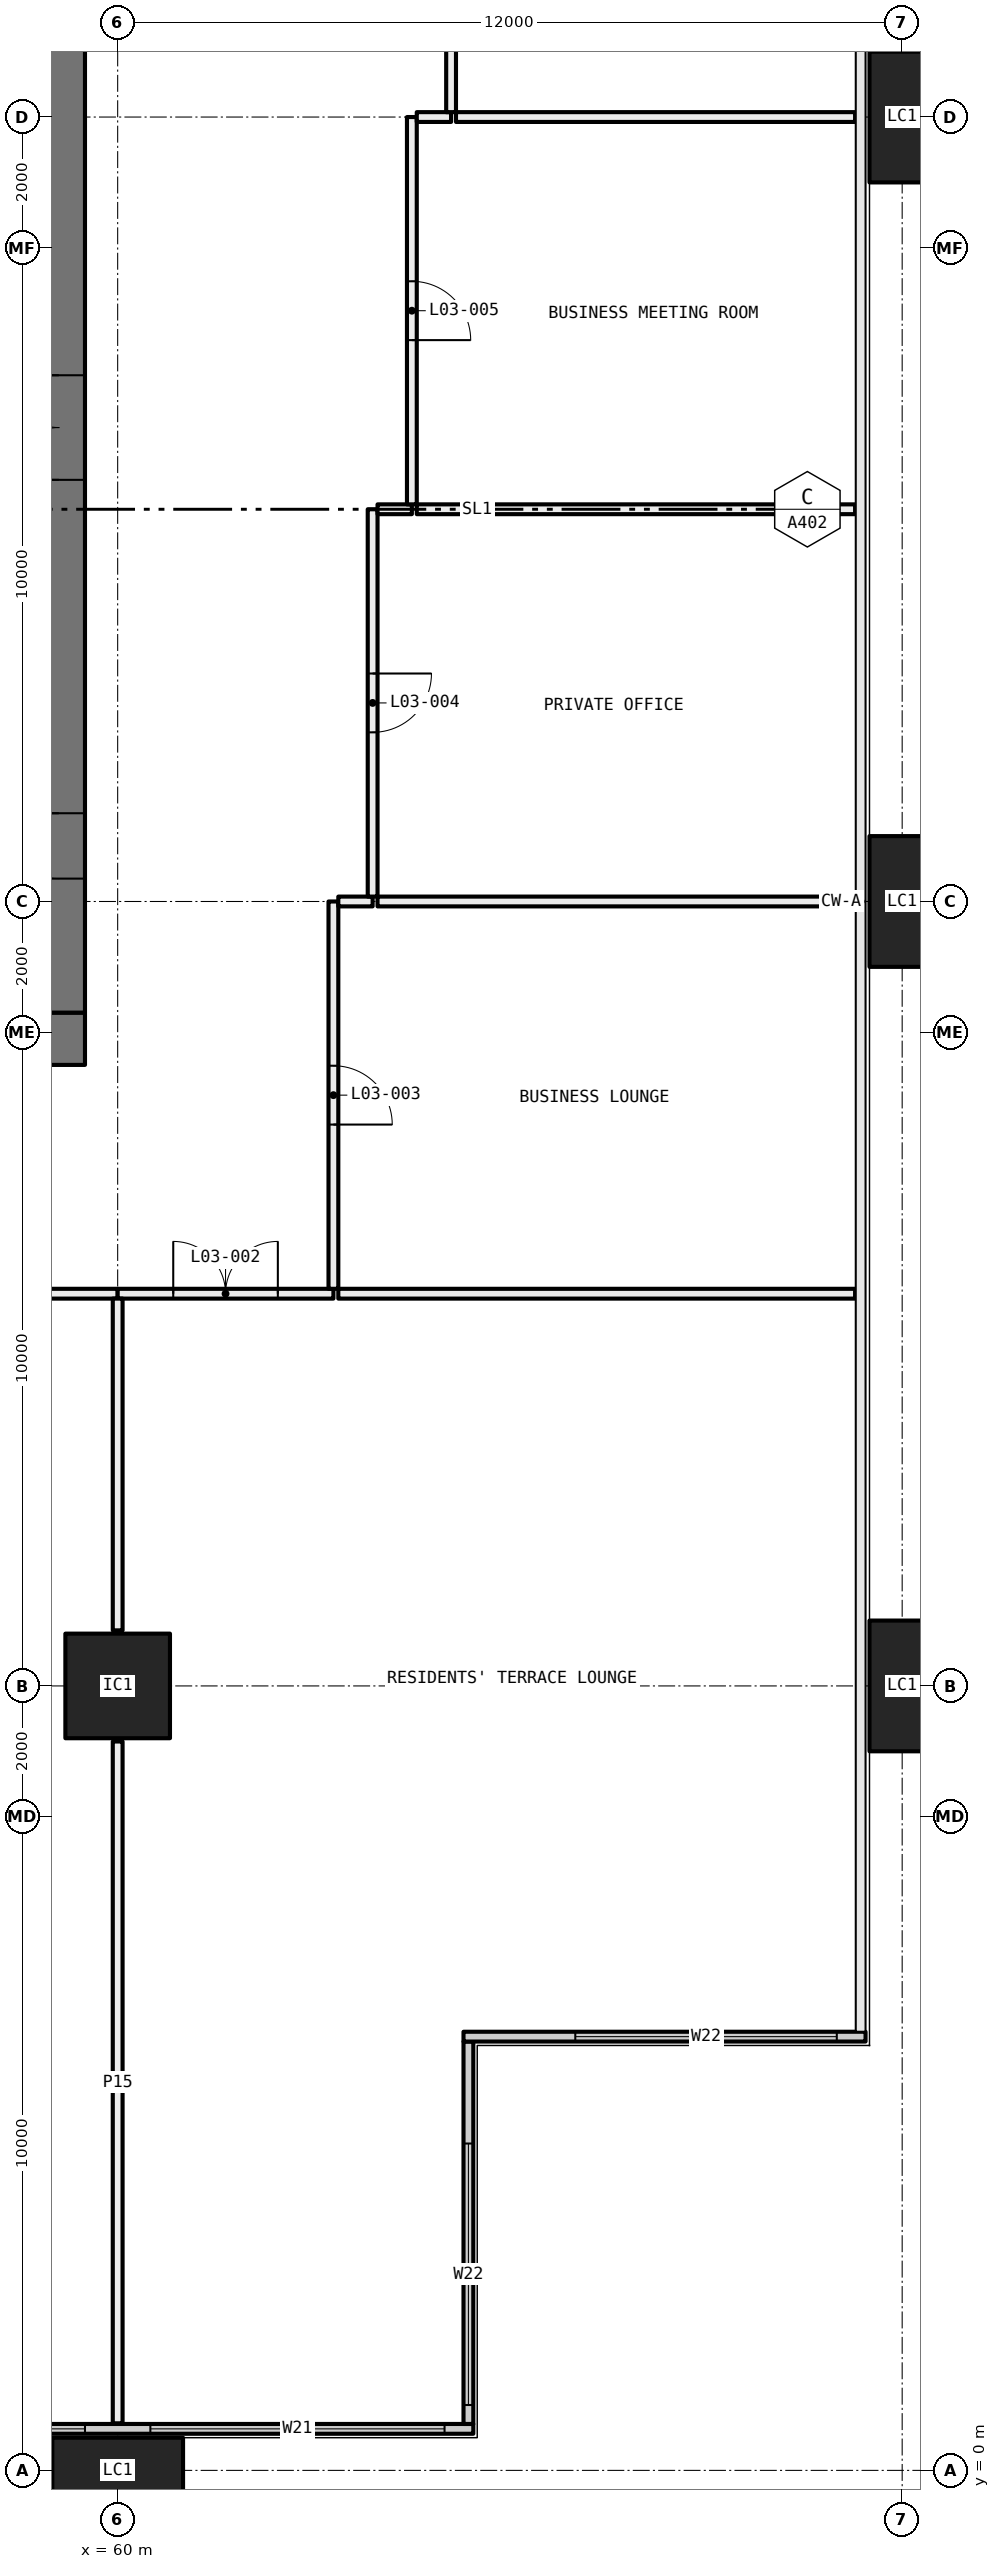
"""IFC4 building model, lengths in metres.
Left out: names, types, materials, properties, quantities, classifications, styles, units other than length and angle.
Written with IfcOpenShell. Run it as: python <this file> out.ifc"""

import sys

from ifc_helpers import new_model, si_unit, direction, frame, frame_2d, origin, origin_2d, place, context, subcontext, project, spatial, rectangle, hollow_rectangle, extrude, element, fill, save


model = new_model("IFC4")
c1 = context("Model", 3, precision=1e-05, world=origin(), true_north=direction((0.0, 1.0)))
c2 = subcontext(c1, "Body", "Model", "MODEL_VIEW")
j1 = project(units=[si_unit("LENGTHUNIT", "METRE"), si_unit("PLANEANGLEUNIT", "RADIAN")], contexts=[c1])
p1 = place(None, origin())
s1 = spatial("IfcSite", under=j1, at=p1, CompositionType="ELEMENT")
p2 = place(p1, origin())
s2 = spatial("IfcBuilding", under=s1, at=p2, CompositionType="ELEMENT")
p3 = place(p2, frame((0.0, 0.0, 18.0)))
s3 = spatial("IfcBuildingStorey", under=s2, at=p3, CompositionType="ELEMENT", Elevation=18.0)
p4 = place(p3, frame((60.0, 0.0, -0.4), z_axis=(0.0, 0.0, 1.0), x_axis=(1.0, 0.0, 0.0)))
e1 = element("IfcColumn", 1, at=p4, inside=s3, PredefinedType="COLUMN", context=c2, shape_type="SweptSolid", body=[
    extrude(hollow_rectangle(XDim=2.0, YDim=1.0, WallThickness=0.08, at=origin_2d()), origin(), (0.0, 0.0, 1.0), 6.0),
])
p5 = place(p3, frame((60.0, 12.0, 0.0), z_axis=(0.0, 0.0, 1.0), x_axis=(1.0, 0.0, 0.0)))
e2 = element("IfcColumn", 2, at=p5, inside=s3, PredefinedType="COLUMN", context=c2, shape_type="SweptSolid", body=[
    extrude(hollow_rectangle(XDim=1.6, YDim=1.6, WallThickness=0.07, at=origin_2d()), origin(), (0.0, 0.0, 1.0), 5.6),
])
for number, where, z_axis, x_axis in (
    (3, (72.0, 12.0, -0.4), (0.0, 0.0, 1.0), (0.0, 1.0, 0.0)),
    (4, (72.0, 24.0, -0.4), (0.0, 0.0, 1.0), (0.0, 1.0, 0.0)),
    (5, (72.0, 36.0, -0.4), (0.0, 0.0, 1.0), (0.0, 1.0, 0.0)),
):
    element("IfcColumn", number, at=place(p3, frame(where, z_axis=z_axis, x_axis=x_axis)), inside=s3, PredefinedType="COLUMN", context=c2, shape_type="SweptSolid", body=[
        extrude(hollow_rectangle(XDim=2.0, YDim=1.0, WallThickness=0.08, at=origin_2d()), origin(), (0.0, 0.0, 1.0), 6.0),
    ])
p6 = place(p3, frame((48.56, 0.635, 0.0), z_axis=(0.0, 0.0, 1.0), x_axis=(1.0, 0.0, 0.0)))
e6 = element("IfcWall", 6, at=p6, inside=s3, PredefinedType="ELEMENTEDWALL", context=c2, shape_type="SweptSolid", body=[
    extrude(rectangle(XDim=16.88, YDim=0.15, at=frame_2d((8.44, 0.0))), origin(), (0.0, 0.0, 1.0), 5.6),
])
p7 = place(p6, frame((0.44, 0.0, 0.45)))
e7 = element("IfcOpeningElement", 7, at=p7, cuts=e6, PredefinedType="OPENING", context=c2, shape_type="SweptSolid", body=[
    extrude(rectangle(XDim=4.5, YDim=5.1, at=frame_2d((2.25, 2.55))), frame((0.0, 0.085, 0.0), z_axis=(0.0, -1.0, 0.0), x_axis=(1.0, 0.0, 0.0)), (0.0, 0.0, 1.0), 0.17),
])
p8 = place(p6, frame((5.94, 0.0, 0.45)))
e8 = element("IfcOpeningElement", 8, at=p8, cuts=e6, PredefinedType="OPENING", context=c2, shape_type="SweptSolid", body=[
    extrude(rectangle(XDim=2.0, YDim=5.1, at=frame_2d((1.0, 2.55))), frame((0.0, 0.085, 0.0), z_axis=(0.0, -1.0, 0.0), x_axis=(1.0, 0.0, 0.0)), (0.0, 0.0, 1.0), 0.17),
])
p9 = place(p6, frame((8.94, 0.0, 0.45)))
e9 = element("IfcOpeningElement", 9, at=p9, cuts=e6, PredefinedType="OPENING", context=c2, shape_type="SweptSolid", body=[
    extrude(rectangle(XDim=2.0, YDim=5.1, at=frame_2d((1.0, 2.55))), frame((0.0, 0.085, 0.0), z_axis=(0.0, -1.0, 0.0), x_axis=(1.0, 0.0, 0.0)), (0.0, 0.0, 1.0), 0.17),
])
p10 = place(p6, frame((11.94, 0.0, 0.45)))
e10 = element("IfcOpeningElement", 10, at=p10, cuts=e6, PredefinedType="OPENING", context=c2, shape_type="SweptSolid", body=[
    extrude(rectangle(XDim=4.5, YDim=5.1, at=frame_2d((2.25, 2.55))), frame((0.0, 0.085, 0.0), z_axis=(0.0, -1.0, 0.0), x_axis=(1.0, 0.0, 0.0)), (0.0, 0.0, 1.0), 0.17),
])
p11 = place(p3, frame((65.365, 0.71, 0.0), z_axis=(0.0, 0.0, 1.0), x_axis=(0.0, 1.0, 0.0)))
e11 = element("IfcWall", 11, at=p11, inside=s3, PredefinedType="ELEMENTEDWALL", context=c2, shape_type="SweptSolid", body=[
    extrude(rectangle(XDim=5.85, YDim=0.15, at=frame_2d((2.925, 0.0))), origin(), (0.0, 0.0, 1.0), 5.6),
])
p12 = place(p11, frame((0.29, 0.0, 0.45)))
e12 = element("IfcOpeningElement", 12, at=p12, cuts=e11, PredefinedType="OPENING", context=c2, shape_type="SweptSolid", body=[
    extrude(rectangle(XDim=4.0, YDim=5.1, at=frame_2d((2.0, 2.55))), frame((0.0, 0.085, 0.0), z_axis=(0.0, -1.0, 0.0), x_axis=(1.0, 0.0, 0.0)), (0.0, 0.0, 1.0), 0.17),
])
p13 = place(p3, frame((65.29, 6.635, 0.0), z_axis=(0.0, 0.0, 1.0), x_axis=(1.0, 0.0, 0.0)))
e13 = element("IfcWall", 13, at=p13, inside=s3, PredefinedType="ELEMENTEDWALL", context=c2, shape_type="SweptSolid", body=[
    extrude(rectangle(XDim=6.15, YDim=0.15, at=frame_2d((3.075, 0.0))), origin(), (0.0, 0.0, 1.0), 5.6),
])
p14 = place(p13, frame((1.71, 0.0, 0.45)))
e14 = element("IfcOpeningElement", 14, at=p14, cuts=e13, PredefinedType="OPENING", context=c2, shape_type="SweptSolid", body=[
    extrude(rectangle(XDim=4.0, YDim=5.1, at=frame_2d((2.0, 2.55))), frame((0.0, 0.085, 0.0), z_axis=(0.0, -1.0, 0.0), x_axis=(1.0, 0.0, 0.0)), (0.0, 0.0, 1.0), 0.17),
])
p15 = place(p3, frame((48.72, 18.0, 0.0), z_axis=(0.0, 0.0, 1.0), x_axis=(1.0, 0.0, 0.0)))
e15 = element("IfcWall", 15, at=p15, inside=s3, PredefinedType="PARTITIONING", context=c2, shape_type="SweptSolid", body=[
    extrude(rectangle(XDim=11.28, YDim=0.15, at=frame_2d((5.64, 0.0))), origin(), (0.0, 0.0, 1.0), 5.6),
])
p16 = place(p15, frame((4.84, 0.0, 0.0)))
e16 = element("IfcOpeningElement", 16, at=p16, cuts=e15, PredefinedType="OPENING", context=c2, shape_type="SweptSolid", body=[
    extrude(rectangle(XDim=1.6, YDim=2.1, at=frame_2d((0.8, 1.05))), frame((0.0, 0.085, 0.0), z_axis=(0.0, -1.0, 0.0), x_axis=(1.0, 0.0, 0.0)), (0.0, 0.0, 1.0), 0.17),
])
p17 = place(p3, frame((60.0, 18.0, 0.0), z_axis=(0.0, 0.0, 1.0), x_axis=(1.0, 0.0, 0.0)))
e17 = element("IfcWall", 17, at=p17, inside=s3, PredefinedType="PARTITIONING", context=c2, shape_type="SweptSolid", body=[
    extrude(rectangle(XDim=3.3, YDim=0.15, at=frame_2d((1.65, 0.0))), origin(), (0.0, 0.0, 1.0), 5.6),
])
p18 = place(p17, frame((0.85, 0.0, 0.0)))
e18 = element("IfcOpeningElement", 18, at=p18, cuts=e17, PredefinedType="OPENING", context=c2, shape_type="SweptSolid", body=[
    extrude(rectangle(XDim=1.6, YDim=2.1, at=frame_2d((0.8, 1.05))), frame((0.0, 0.085, 0.0), z_axis=(0.0, -1.0, 0.0), x_axis=(1.0, 0.0, 0.0)), (0.0, 0.0, 1.0), 0.17),
])
p19 = place(p3, frame((63.3, 18.075, 0.0), z_axis=(0.0, 0.0, 1.0), x_axis=(0.0, 1.0, 0.0)))
e19 = element("IfcWall", 19, at=p19, inside=s3, PredefinedType="PARTITIONING", context=c2, shape_type="SweptSolid", body=[
    extrude(rectangle(XDim=5.925, YDim=0.15, at=frame_2d((2.962, 0.0))), origin(), (0.0, 0.0, 1.0), 5.6),
])
p20 = place(p19, frame((2.512, 0.0, 0.0)))
e20 = element("IfcOpeningElement", 20, at=p20, cuts=e19, PredefinedType="OPENING", context=c2, shape_type="SweptSolid", body=[
    extrude(rectangle(XDim=0.9, YDim=2.1, at=frame_2d((0.45, 1.05))), frame((0.0, 0.085, 0.0), z_axis=(0.0, -1.0, 0.0), x_axis=(1.0, 0.0, 0.0)), (0.0, 0.0, 1.0), 0.17),
])
p21 = place(p3, frame((63.375, 24.0, 0.0), z_axis=(0.0, 0.0, 1.0), x_axis=(1.0, 0.0, 0.0)))
e21 = element("IfcWall", 21, at=p21, inside=s3, PredefinedType="PARTITIONING", context=c2, shape_type="SweptSolid", body=[
    extrude(rectangle(XDim=0.525, YDim=0.15, at=frame_2d((0.262, 0.0))), origin(), (0.0, 0.0, 1.0), 5.6),
])
p22 = place(p3, frame((63.9, 24.075, 0.0), z_axis=(0.0, 0.0, 1.0), x_axis=(0.0, 1.0, 0.0)))
e22 = element("IfcWall", 22, at=p22, inside=s3, PredefinedType="PARTITIONING", context=c2, shape_type="SweptSolid", body=[
    extrude(rectangle(XDim=5.925, YDim=0.15, at=frame_2d((2.962, 0.0))), origin(), (0.0, 0.0, 1.0), 5.6),
])
p23 = place(p22, frame((2.512, 0.0, 0.0)))
e23 = element("IfcOpeningElement", 23, at=p23, cuts=e22, PredefinedType="OPENING", context=c2, shape_type="SweptSolid", body=[
    extrude(rectangle(XDim=0.9, YDim=2.1, at=frame_2d((0.45, 1.05))), frame((0.0, 0.085, 0.0), z_axis=(0.0, -1.0, 0.0), x_axis=(1.0, 0.0, 0.0)), (0.0, 0.0, 1.0), 0.17),
])
p24 = place(p3, frame((63.975, 30.0, 0.0), z_axis=(0.0, 0.0, 1.0), x_axis=(1.0, 0.0, 0.0)))
e24 = element("IfcWall", 24, at=p24, inside=s3, PredefinedType="PARTITIONING", context=c2, shape_type="SweptSolid", body=[
    extrude(rectangle(XDim=0.525, YDim=0.15, at=frame_2d((0.262, 0.0))), origin(), (0.0, 0.0, 1.0), 5.6),
])
p25 = place(p3, frame((64.5, 30.075, 0.0), z_axis=(0.0, 0.0, 1.0), x_axis=(0.0, 1.0, 0.0)))
e25 = element("IfcWall", 25, at=p25, inside=s3, PredefinedType="PARTITIONING", context=c2, shape_type="SweptSolid", body=[
    extrude(rectangle(XDim=5.925, YDim=0.15, at=frame_2d((2.962, 0.0))), origin(), (0.0, 0.0, 1.0), 5.6),
])
p26 = place(p25, frame((2.512, 0.0, 0.0)))
e26 = element("IfcOpeningElement", 26, at=p26, cuts=e25, PredefinedType="OPENING", context=c2, shape_type="SweptSolid", body=[
    extrude(rectangle(XDim=0.9, YDim=2.1, at=frame_2d((0.45, 1.05))), frame((0.0, 0.085, 0.0), z_axis=(0.0, -1.0, 0.0), x_axis=(1.0, 0.0, 0.0)), (0.0, 0.0, 1.0), 0.17),
])
p27 = place(p3, frame((64.575, 36.0, 0.0), z_axis=(0.0, 0.0, 1.0), x_axis=(1.0, 0.0, 0.0)))
e27 = element("IfcWall", 27, at=p27, inside=s3, PredefinedType="PARTITIONING", context=c2, shape_type="SweptSolid", body=[
    extrude(rectangle(XDim=0.525, YDim=0.15, at=frame_2d((0.263, 0.0))), origin(), (0.0, 0.0, 1.0), 5.6),
])
p28 = place(p3, frame((65.1, 36.075, 0.0), z_axis=(0.0, 0.0, 1.0), x_axis=(0.0, 1.0, 0.0)))
e28 = element("IfcWall", 28, at=p28, inside=s3, PredefinedType="PARTITIONING", context=c2, shape_type="SweptSolid", body=[
    extrude(rectangle(XDim=5.825, YDim=0.15, at=frame_2d((2.913, 0.0))), origin(), (0.0, 0.0, 1.0), 5.6),
])
p29 = place(p28, frame((2.462, 0.0, 0.0)))
e29 = element("IfcOpeningElement", 29, at=p29, cuts=e28, PredefinedType="OPENING", context=c2, shape_type="SweptSolid", body=[
    extrude(rectangle(XDim=0.9, YDim=2.1, at=frame_2d((0.45, 1.05))), frame((0.0, 0.085, 0.0), z_axis=(0.0, -1.0, 0.0), x_axis=(1.0, 0.0, 0.0)), (0.0, 0.0, 1.0), 0.17),
])
p30 = place(p3, frame((60.0, 0.72, 0.0), z_axis=(0.0, 0.0, 1.0), x_axis=(0.0, 1.0, 0.0)))
e30 = element("IfcWall", 30, at=p30, inside=s3, PredefinedType="PARTITIONING", context=c2, shape_type="SweptSolid", body=[
    extrude(rectangle(XDim=10.43, YDim=0.15, at=frame_2d((5.215, 0.0))), origin(), (0.0, 0.0, 1.0), 5.6),
])
p31 = place(p3, frame((60.0, 12.85, 0.0), z_axis=(0.0, 0.0, 1.0), x_axis=(0.0, 1.0, 0.0)))
e31 = element("IfcWall", 31, at=p31, inside=s3, PredefinedType="PARTITIONING", context=c2, shape_type="SweptSolid", body=[
    extrude(rectangle(XDim=5.075, YDim=0.15, at=frame_2d((2.538, 0.0))), origin(), (0.0, 0.0, 1.0), 5.6),
])
p32 = place(p3, frame((71.28, 18.0, 0.0), z_axis=(0.0, 0.0, 1.0), x_axis=(-1.0, 0.0, 0.0)))
e32 = element("IfcWall", 32, at=p32, inside=s3, PredefinedType="PARTITIONING", context=c2, shape_type="SweptSolid", body=[
    extrude(rectangle(XDim=7.905, YDim=0.15, at=frame_2d((3.953, 0.0))), origin(), (0.0, 0.0, 1.0), 5.6),
])
p33 = place(p3, frame((71.28, 24.0, 0.0), z_axis=(0.0, 0.0, 1.0), x_axis=(-1.0, 0.0, 0.0)))
e33 = element("IfcWall", 33, at=p33, inside=s3, PredefinedType="PARTITIONING", context=c2, shape_type="SweptSolid", body=[
    extrude(rectangle(XDim=7.305, YDim=0.15, at=frame_2d((3.652, 0.0))), origin(), (0.0, 0.0, 1.0), 5.6),
])
p34 = place(p3, frame((71.28, 30.0, 0.0), z_axis=(0.0, 0.0, 1.0), x_axis=(-1.0, 0.0, 0.0)))
e34 = element("IfcWall", 34, at=p34, inside=s3, PredefinedType="PARTITIONING", context=c2, shape_type="SweptSolid", body=[
    extrude(rectangle(XDim=6.705, YDim=0.15, at=frame_2d((3.353, 0.0))), origin(), (0.0, 0.0, 1.0), 5.6),
])
p35 = place(p3, frame((71.28, 36.0, 0.0), z_axis=(0.0, 0.0, 1.0), x_axis=(-1.0, 0.0, 0.0)))
e35 = element("IfcWall", 35, at=p35, inside=s3, PredefinedType="PARTITIONING", context=c2, shape_type="SweptSolid", body=[
    extrude(rectangle(XDim=6.105, YDim=0.15, at=frame_2d((3.052, 0.0))), origin(), (0.0, 0.0, 1.0), 5.6),
])
p36 = place(p3, frame((59.5, 21.9, 0.0), z_axis=(0.0, 0.0, 1.0), x_axis=(-1.0, 0.0, 0.0)))
e36 = element("IfcWall", 36, at=p36, inside=s3, PredefinedType="SHEAR", context=c2, shape_type="SweptSolid", body=[
    extrude(rectangle(XDim=11.0, YDim=0.8, at=frame_2d((5.5, 0.0))), origin(), (0.0, 0.0, 1.0), 5.6),
])
p37 = place(p3, frame((59.1, 22.3, 0.0), z_axis=(0.0, 0.0, 1.0), x_axis=(0.0, 1.0, 0.0)))
e37 = element("IfcWall", 37, at=p37, inside=s3, PredefinedType="SHEAR", context=c2, shape_type="SweptSolid", body=[
    extrude(rectangle(XDim=15.4, YDim=0.8, at=frame_2d((7.7, 0.0))), origin(), (0.0, 0.0, 1.0), 5.6),
])
p38 = place(p37, frame((8.15, 0.0, 0.0)))
e38 = element("IfcOpeningElement", 38, at=p38, cuts=e37, PredefinedType="OPENING", context=c2, shape_type="SweptSolid", body=[
    extrude(rectangle(XDim=1.6, YDim=2.1, at=frame_2d((0.8, 1.05))), frame((0.0, 0.41, 0.0), z_axis=(0.0, -1.0, 0.0), x_axis=(1.0, 0.0, 0.0)), (0.0, 0.0, 1.0), 0.82),
])
p39 = place(p37, frame((2.05, 0.0, 0.0)))
e39 = element("IfcOpeningElement", 39, at=p39, cuts=e37, PredefinedType="OPENING", context=c2, shape_type="SweptSolid", body=[
    extrude(rectangle(XDim=1.0, YDim=2.1, at=frame_2d((0.5, 1.05))), frame((0.0, 0.41, 0.0), z_axis=(0.0, -1.0, 0.0), x_axis=(1.0, 0.0, 0.0)), (0.0, 0.0, 1.0), 0.82),
])
p40 = place(p9, origin())
e40 = element("IfcWindow", 40, at=p40, inside=s3, PartitioningType="SINGLE_PANEL", PredefinedType="WINDOW", context=c2, shape_type="SweptSolid", body=[
    extrude(rectangle(XDim=2.0, YDim=5.1, at=frame_2d((1.0, 2.55))), frame((0.0, 0.03, 0.0), z_axis=(0.0, -1.0, 0.0), x_axis=(1.0, 0.0, 0.0)), (0.0, 0.0, 1.0), 0.06),
])
fill(e9, e40)
p41 = place(p10, origin())
e41 = element("IfcWindow", 41, at=p41, inside=s3, PartitioningType="SINGLE_PANEL", PredefinedType="WINDOW", context=c2, shape_type="SweptSolid", body=[
    extrude(rectangle(XDim=4.5, YDim=5.1, at=frame_2d((2.25, 2.55))), frame((0.0, 0.03, 0.0), z_axis=(0.0, -1.0, 0.0), x_axis=(1.0, 0.0, 0.0)), (0.0, 0.0, 1.0), 0.06),
])
fill(e10, e41)
p42 = place(p12, origin())
e42 = element("IfcWindow", 42, at=p42, inside=s3, PartitioningType="SINGLE_PANEL", PredefinedType="WINDOW", context=c2, shape_type="SweptSolid", body=[
    extrude(rectangle(XDim=4.0, YDim=5.1, at=frame_2d((2.0, 2.55))), frame((0.0, 0.03, 0.0), z_axis=(0.0, -1.0, 0.0), x_axis=(1.0, 0.0, 0.0)), (0.0, 0.0, 1.0), 0.06),
])
fill(e12, e42)
p43 = place(p14, origin())
e43 = element("IfcWindow", 43, at=p43, inside=s3, PartitioningType="SINGLE_PANEL", PredefinedType="WINDOW", context=c2, shape_type="SweptSolid", body=[
    extrude(rectangle(XDim=4.0, YDim=5.1, at=frame_2d((2.0, 2.55))), frame((0.0, 0.03, 0.0), z_axis=(0.0, -1.0, 0.0), x_axis=(1.0, 0.0, 0.0)), (0.0, 0.0, 1.0), 0.06),
])
fill(e14, e43)
p44 = place(p18, origin())
e44 = element("IfcDoor", 44, at=p44, inside=s3, OperationType="DOUBLE_DOOR_SINGLE_SWING", PredefinedType="DOOR", context=c2, shape_type="SweptSolid", body=[
    extrude(rectangle(XDim=1.6, YDim=2.1, at=frame_2d((0.8, 1.05))), frame((0.0, 0.025, 0.0), z_axis=(0.0, -1.0, 0.0), x_axis=(1.0, 0.0, 0.0)), (0.0, 0.0, 1.0), 0.05),
])
fill(e18, e44)
p45 = place(p20, frame((0.9, 0.0, 0.0), x_axis=(-1.0, 0.0, 0.0)))
e45 = element("IfcDoor", 45, at=p45, inside=s3, OperationType="SINGLE_SWING_LEFT", PredefinedType="DOOR", context=c2, shape_type="SweptSolid", body=[
    extrude(rectangle(XDim=0.9, YDim=2.1, at=frame_2d((0.45, 1.05))), frame((0.0, 0.025, 0.0), z_axis=(0.0, -1.0, 0.0), x_axis=(1.0, 0.0, 0.0)), (0.0, 0.0, 1.0), 0.05),
])
fill(e20, e45)
p46 = place(p23, frame((0.9, 0.0, 0.0), x_axis=(-1.0, 0.0, 0.0)))
e46 = element("IfcDoor", 46, at=p46, inside=s3, OperationType="SINGLE_SWING_RIGHT", PredefinedType="DOOR", context=c2, shape_type="SweptSolid", body=[
    extrude(rectangle(XDim=0.9, YDim=2.1, at=frame_2d((0.45, 1.05))), frame((0.0, 0.025, 0.0), z_axis=(0.0, -1.0, 0.0), x_axis=(1.0, 0.0, 0.0)), (0.0, 0.0, 1.0), 0.05),
])
fill(e23, e46)
p47 = place(p26, frame((0.9, 0.0, 0.0), x_axis=(-1.0, 0.0, 0.0)))
e47 = element("IfcDoor", 47, at=p47, inside=s3, OperationType="SINGLE_SWING_LEFT", PredefinedType="DOOR", context=c2, shape_type="SweptSolid", body=[
    extrude(rectangle(XDim=0.9, YDim=2.1, at=frame_2d((0.45, 1.05))), frame((0.0, 0.025, 0.0), z_axis=(0.0, -1.0, 0.0), x_axis=(1.0, 0.0, 0.0)), (0.0, 0.0, 1.0), 0.05),
])
fill(e26, e47)
p48 = place(p38, origin())
e48 = element("IfcDoor", 48, at=p48, inside=s3, OperationType="DOUBLE_DOOR_SINGLE_SWING", PredefinedType="DOOR", context=c2, shape_type="SweptSolid", body=[
    extrude(rectangle(XDim=1.6, YDim=2.1, at=frame_2d((0.8, 1.05))), frame((0.0, 0.025, 0.0), z_axis=(0.0, -1.0, 0.0), x_axis=(1.0, 0.0, 0.0)), (0.0, 0.0, 1.0), 0.05),
])
fill(e38, e48)
p49 = place(p39, origin())
e49 = element("IfcDoor", 49, at=p49, inside=s3, OperationType="SINGLE_SWING_LEFT", PredefinedType="DOOR", context=c2, shape_type="SweptSolid", body=[
    extrude(rectangle(XDim=1.0, YDim=2.1, at=frame_2d((0.5, 1.05))), frame((0.0, 0.025, 0.0), z_axis=(0.0, -1.0, 0.0), x_axis=(1.0, 0.0, 0.0)), (0.0, 0.0, 1.0), 0.05),
])
fill(e39, e49)
save(model, sys.argv[1])
